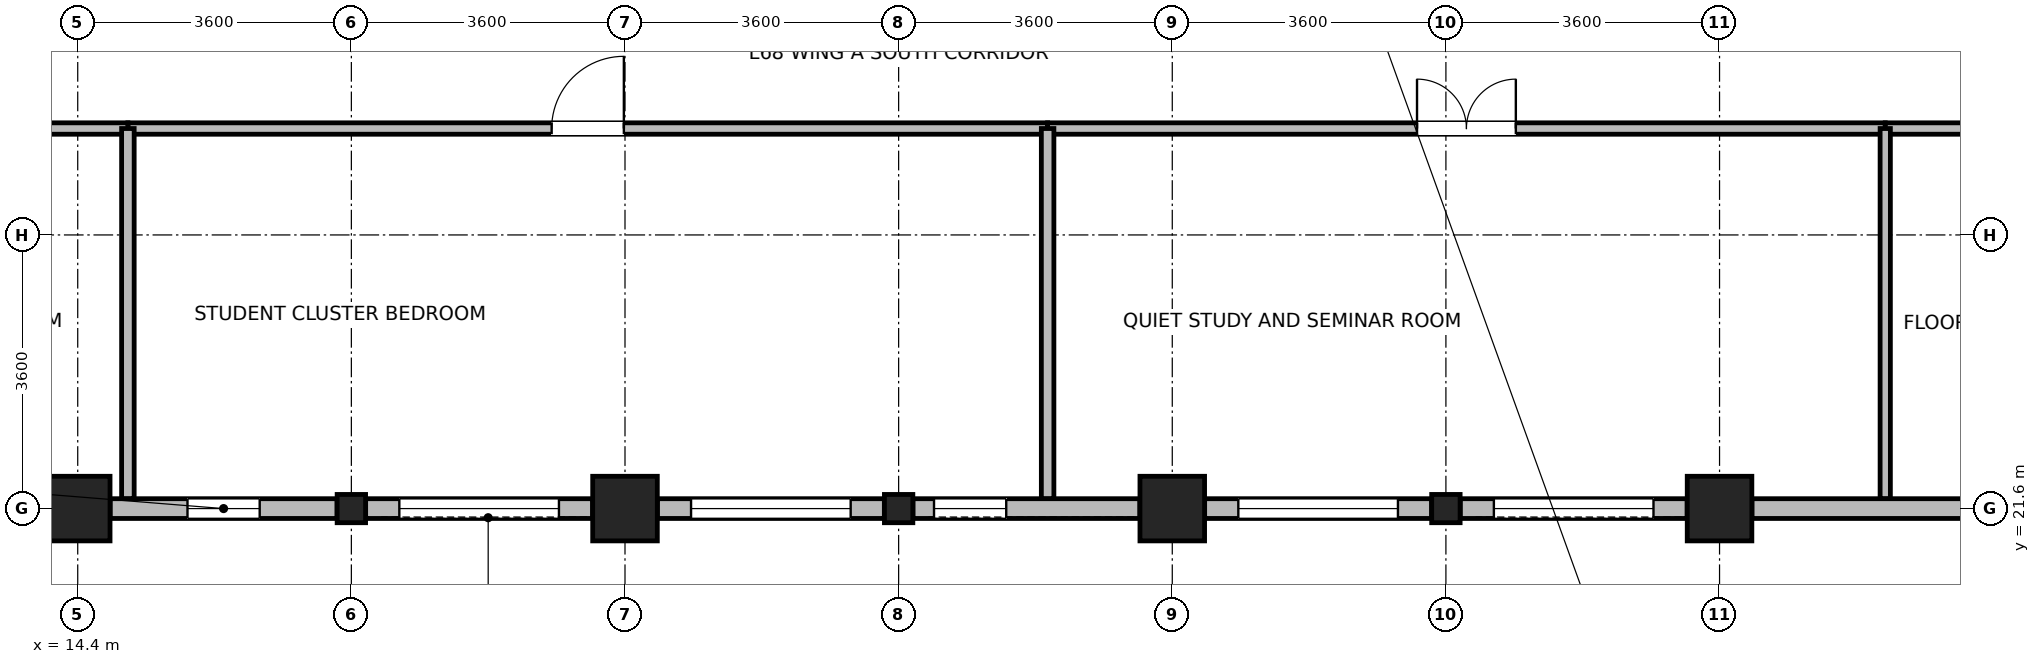
"""IFC4 building model, lengths in metres.
Left out: names, types, materials, properties, quantities, classifications, styles, units other than length and angle.
Written with IfcOpenShell. Run it as: python <this file> out.ifc"""

import sys

from ifc_helpers import new_model, si_unit, direction, frame, frame_2d, origin, origin_2d, place, context, subcontext, project, spatial, rectangle, i_section, extrude, source, transform, mapped, element, fill, save


model = new_model("IFC4")
c1 = context("Model", 3, precision=1e-05, world=origin(), true_north=direction((0.0, 1.0)))
c2 = subcontext(c1, "Body", "Model", "MODEL_VIEW")
j1 = project(units=[si_unit("LENGTHUNIT", "METRE"), si_unit("PLANEANGLEUNIT", "RADIAN")], contexts=[c1])
p1 = place(None, origin())
s1 = spatial("IfcSite", under=j1, at=p1, CompositionType="ELEMENT")
p2 = place(p1, origin())
s2 = spatial("IfcBuilding", under=s1, at=p2, CompositionType="ELEMENT")
p3 = place(p2, frame((0.0, 0.0, 264.7)))
s3 = spatial("IfcBuildingStorey", under=s2, at=p3, CompositionType="ELEMENT", Elevation=264.7)
m1 = source(origin(), c2, "Body", "SweptSolid", [
    extrude(rectangle(XDim=0.85, YDim=0.85, at=origin_2d()), origin(), (0.0, 0.0, 1.0), 3.7),
])
for number, where, z_axis, x_axis in (
    (1, (14.4, 21.6, 0.0), (0.0, 0.0, 1.0), (1.0, 0.0, 0.0)),
    (2, (21.6, 21.6, 0.0), (0.0, 0.0, 1.0), (1.0, 0.0, 0.0)),
    (3, (28.8, 21.6, 0.0), (0.0, 0.0, 1.0), (1.0, 0.0, 0.0)),
    (4, (36.0, 21.6, 0.0), (0.0, 0.0, 1.0), (1.0, 0.0, 0.0)),
):
    element("IfcColumn", number, at=place(p3, frame(where, z_axis=z_axis, x_axis=x_axis)), inside=s3, PredefinedType="COLUMN", context=c2, shape_type="MappedRepresentation", body=[
        mapped(m1, transform((0.0, 0.0, 0.0), x_axis=(1.0, 0.0, 0.0), y_axis=(0.0, 1.0, 0.0), z_axis=(0.0, 0.0, 1.0), scale=1.0)),
    ])
m2 = source(origin(), c2, "Body", "SweptSolid", [
    extrude(i_section(OverallWidth=0.374, OverallDepth=0.372, WebThickness=0.015, FlangeThickness=0.026, FilletRadius=0.015, at=origin_2d()), origin(), (0.0, 0.0, 1.0), 3.7),
])
for number, where, z_axis, x_axis in (
    (5, (18.0, 21.6, 0.0), (0.0, 0.0, 1.0), (1.0, 0.0, 0.0)),
    (6, (25.2, 21.6, 0.0), (0.0, 0.0, 1.0), (1.0, 0.0, 0.0)),
    (7, (32.4, 21.6, 0.0), (0.0, 0.0, 1.0), (1.0, 0.0, 0.0)),
):
    element("IfcColumn", number, at=place(p3, frame(where, z_axis=z_axis, x_axis=x_axis)), inside=s3, PredefinedType="COLUMN", context=c2, shape_type="MappedRepresentation", body=[
        mapped(m2, transform((0.0, 0.0, 0.0), x_axis=(1.0, 0.0, 0.0), y_axis=(0.0, 1.0, 0.0), z_axis=(0.0, 0.0, 1.0), scale=1.0)),
    ])
p4 = place(p3, frame((17.812, 21.6, 0.0), z_axis=(0.0, 0.0, 1.0), x_axis=(-1.0, 0.0, 0.0)))
e8 = element("IfcWall", 8, at=p4, inside=s3, PredefinedType="STANDARD", context=c2, shape_type="SweptSolid", body=[
    extrude(rectangle(XDim=2.986, YDim=0.26, at=frame_2d((1.493, 0.0))), origin(), (0.0, 0.0, 1.0), 3.055),
])
p5 = place(p4, frame((1.018, 0.0, 0.85)))
e9 = element("IfcOpeningElement", 9, at=p5, cuts=e8, PredefinedType="OPENING", context=c2, shape_type="SweptSolid", body=[
    extrude(rectangle(XDim=0.95, YDim=1.75, at=frame_2d((0.475, 0.875))), frame((0.0, 0.14, 0.0), z_axis=(0.0, -1.0, 0.0), x_axis=(1.0, 0.0, 0.0)), (0.0, 0.0, 1.0), 0.28),
])
p6 = place(p3, frame((21.174, 21.6, 0.0), z_axis=(0.0, 0.0, 1.0), x_axis=(-1.0, 0.0, 0.0)))
e10 = element("IfcWall", 10, at=p6, inside=s3, PredefinedType="STANDARD", context=c2, shape_type="SweptSolid", body=[
    extrude(rectangle(XDim=2.986, YDim=0.26, at=frame_2d((1.493, 0.0))), origin(), (0.0, 0.0, 1.0), 3.055),
])
p7 = place(p6, frame((0.443, 0.0, 0.85)))
e11 = element("IfcOpeningElement", 11, at=p7, cuts=e10, PredefinedType="OPENING", context=c2, shape_type="SweptSolid", body=[
    extrude(rectangle(XDim=2.1, YDim=1.95, at=frame_2d((1.05, 0.975))), frame((0.0, 0.14, 0.0), z_axis=(0.0, -1.0, 0.0), x_axis=(1.0, 0.0, 0.0)), (0.0, 0.0, 1.0), 0.28),
])
p8 = place(p3, frame((25.012, 21.6, 0.0), z_axis=(0.0, 0.0, 1.0), x_axis=(-1.0, 0.0, 0.0)))
e12 = element("IfcWall", 12, at=p8, inside=s3, PredefinedType="STANDARD", context=c2, shape_type="SweptSolid", body=[
    extrude(rectangle(XDim=2.986, YDim=0.26, at=frame_2d((1.493, 0.0))), origin(), (0.0, 0.0, 1.0), 3.055),
])
p9 = place(p8, frame((0.443, 0.0, 0.85)))
e13 = element("IfcOpeningElement", 13, at=p9, cuts=e12, PredefinedType="OPENING", context=c2, shape_type="SweptSolid", body=[
    extrude(rectangle(XDim=2.1, YDim=1.95, at=frame_2d((1.05, 0.975))), frame((0.0, 0.14, 0.0), z_axis=(0.0, -1.0, 0.0), x_axis=(1.0, 0.0, 0.0)), (0.0, 0.0, 1.0), 0.28),
])
p10 = place(p3, frame((28.374, 21.6, 0.0), z_axis=(0.0, 0.0, 1.0), x_axis=(-1.0, 0.0, 0.0)))
e14 = element("IfcWall", 14, at=p10, inside=s3, PredefinedType="STANDARD", context=c2, shape_type="SweptSolid", body=[
    extrude(rectangle(XDim=2.986, YDim=0.26, at=frame_2d((1.493, 0.0))), origin(), (0.0, 0.0, 1.0), 3.055),
])
p11 = place(p10, frame((1.759, 0.0, 0.85)))
e15 = element("IfcOpeningElement", 15, at=p11, cuts=e14, PredefinedType="OPENING", context=c2, shape_type="SweptSolid", body=[
    extrude(rectangle(XDim=0.95, YDim=1.75, at=frame_2d((0.475, 0.875))), frame((0.0, 0.14, 0.0), z_axis=(0.0, -1.0, 0.0), x_axis=(1.0, 0.0, 0.0)), (0.0, 0.0, 1.0), 0.28),
])
p12 = place(p3, frame((32.212, 21.6, 0.0), z_axis=(0.0, 0.0, 1.0), x_axis=(-1.0, 0.0, 0.0)))
e16 = element("IfcWall", 16, at=p12, inside=s3, PredefinedType="STANDARD", context=c2, shape_type="SweptSolid", body=[
    extrude(rectangle(XDim=2.986, YDim=0.26, at=frame_2d((1.493, 0.0))), origin(), (0.0, 0.0, 1.0), 3.055),
])
p13 = place(p12, frame((0.443, 0.0, 0.85)))
e17 = element("IfcOpeningElement", 17, at=p13, cuts=e16, PredefinedType="OPENING", context=c2, shape_type="SweptSolid", body=[
    extrude(rectangle(XDim=2.1, YDim=1.95, at=frame_2d((1.05, 0.975))), frame((0.0, 0.14, 0.0), z_axis=(0.0, -1.0, 0.0), x_axis=(1.0, 0.0, 0.0)), (0.0, 0.0, 1.0), 0.28),
])
p14 = place(p3, frame((35.574, 21.6, 0.0), z_axis=(0.0, 0.0, 1.0), x_axis=(-1.0, 0.0, 0.0)))
e18 = element("IfcWall", 18, at=p14, inside=s3, PredefinedType="STANDARD", context=c2, shape_type="SweptSolid", body=[
    extrude(rectangle(XDim=2.986, YDim=0.26, at=frame_2d((1.493, 0.0))), origin(), (0.0, 0.0, 1.0), 3.055),
])
p15 = place(p14, frame((0.443, 0.0, 0.85)))
e19 = element("IfcOpeningElement", 19, at=p15, cuts=e18, PredefinedType="OPENING", context=c2, shape_type="SweptSolid", body=[
    extrude(rectangle(XDim=2.1, YDim=1.95, at=frame_2d((1.05, 0.975))), frame((0.0, 0.14, 0.0), z_axis=(0.0, -1.0, 0.0), x_axis=(1.0, 0.0, 0.0)), (0.0, 0.0, 1.0), 0.28),
])
p16 = place(p3, frame((46.374, 21.6, 0.0), z_axis=(0.0, 0.0, 1.0), x_axis=(-1.0, 0.0, 0.0)))
e20 = element("IfcWall", 20, at=p16, inside=s3, PredefinedType="STANDARD", context=c2, shape_type="SweptSolid", body=[
    extrude(rectangle(XDim=9.948, YDim=0.26, at=frame_2d((4.974, 0.0))), origin(), (0.0, 0.0, 1.0), 3.055),
])
p17 = place(p16, frame((0.608, 0.0, 0.85)))
e21 = element("IfcOpeningElement", 21, at=p17, cuts=e20, PredefinedType="OPENING", context=c2, shape_type="SweptSolid", body=[
    extrude(rectangle(XDim=2.1, YDim=1.95, at=frame_2d((1.05, 0.975))), frame((0.0, 0.14, 0.0), z_axis=(0.0, -1.0, 0.0), x_axis=(1.0, 0.0, 0.0)), (0.0, 0.0, 1.0), 0.28),
])
p18 = place(p16, frame((3.924, 0.0, 0.85)))
e22 = element("IfcOpeningElement", 22, at=p18, cuts=e20, PredefinedType="OPENING", context=c2, shape_type="SweptSolid", body=[
    extrude(rectangle(XDim=2.1, YDim=1.95, at=frame_2d((1.05, 0.975))), frame((0.0, 0.14, 0.0), z_axis=(0.0, -1.0, 0.0), x_axis=(1.0, 0.0, 0.0)), (0.0, 0.0, 1.0), 0.28),
])
p19 = place(p3, frame((15.06, 26.6, 0.0), z_axis=(0.0, 0.0, 1.0), x_axis=(1.0, 0.0, 0.0)))
e23 = element("IfcWall", 23, at=p19, inside=s3, PredefinedType="PARTITIONING", context=c2, shape_type="SweptSolid", body=[
    extrude(rectangle(XDim=12.1, YDim=0.15, at=frame_2d((6.05, 0.0))), origin(), (0.0, 0.0, 1.0), 3.455),
])
p20 = place(p19, frame((5.575, 0.0, 0.0)))
e24 = element("IfcOpeningElement", 24, at=p20, cuts=e23, PredefinedType="OPENING", context=c2, shape_type="SweptSolid", body=[
    extrude(rectangle(XDim=0.95, YDim=2.1, at=frame_2d((0.475, 1.05))), frame((0.0, 0.085, 0.0), z_axis=(0.0, -1.0, 0.0), x_axis=(1.0, 0.0, 0.0)), (0.0, 0.0, 1.0), 0.17),
])
p21 = place(p3, frame((3.732, 26.6, 0.0), z_axis=(0.0, 0.0, 1.0), x_axis=(1.0, 0.0, 0.0)))
e25 = element("IfcWall", 25, at=p21, inside=s3, PredefinedType="PARTITIONING", context=c2, shape_type="SweptSolid", body=[
    extrude(rectangle(XDim=11.328, YDim=0.15, at=frame_2d((5.664, 0.0))), origin(), (0.0, 0.0, 1.0), 3.455),
])
p22 = place(p21, frame((5.189, 0.0, 0.0)))
e26 = element("IfcOpeningElement", 26, at=p22, cuts=e25, PredefinedType="OPENING", context=c2, shape_type="SweptSolid", body=[
    extrude(rectangle(XDim=0.95, YDim=2.1, at=frame_2d((0.475, 1.05))), frame((0.0, 0.085, 0.0), z_axis=(0.0, -1.0, 0.0), x_axis=(1.0, 0.0, 0.0)), (0.0, 0.0, 1.0), 0.17),
])
p23 = place(p3, frame((27.16, 26.6, 0.0), z_axis=(0.0, 0.0, 1.0), x_axis=(1.0, 0.0, 0.0)))
e27 = element("IfcWall", 27, at=p23, inside=s3, PredefinedType="PARTITIONING", context=c2, shape_type="SweptSolid", body=[
    extrude(rectangle(XDim=11.02, YDim=0.15, at=frame_2d((5.51, 0.0))), origin(), (0.0, 0.0, 1.0), 3.455),
])
p24 = place(p23, frame((4.86, 0.0, 0.0)))
e28 = element("IfcOpeningElement", 28, at=p24, cuts=e27, PredefinedType="OPENING", context=c2, shape_type="SweptSolid", body=[
    extrude(rectangle(XDim=1.3, YDim=2.12, at=frame_2d((0.65, 1.06))), frame((0.0, 0.085, 0.0), z_axis=(0.0, -1.0, 0.0), x_axis=(1.0, 0.0, 0.0)), (0.0, 0.0, 1.0), 0.17),
])
p25 = place(p3, frame((38.18, 26.6, 0.0), z_axis=(0.0, 0.0, 1.0), x_axis=(1.0, 0.0, 0.0)))
e29 = element("IfcWall", 29, at=p25, inside=s3, PredefinedType="PARTITIONING", context=c2, shape_type="SweptSolid", body=[
    extrude(rectangle(XDim=8.6, YDim=0.15, at=frame_2d((4.3, 0.0))), origin(), (0.0, 0.0, 1.0), 3.455),
])
p26 = place(p25, frame((3.875, 0.0, 0.0)))
e30 = element("IfcOpeningElement", 30, at=p26, cuts=e29, PredefinedType="OPENING", context=c2, shape_type="SweptSolid", body=[
    extrude(rectangle(XDim=0.85, YDim=2.04, at=frame_2d((0.425, 1.02))), frame((0.0, 0.085, 0.0), z_axis=(0.0, -1.0, 0.0), x_axis=(1.0, 0.0, 0.0)), (0.0, 0.0, 1.0), 0.17),
])
for number, where, z_axis, x_axis in (
    (31, (15.06, 21.732, 0.0), (0.0, 0.0, 1.0), (0.0, 1.0, 0.0)),
    (32, (27.16, 21.732, 0.0), (0.0, 0.0, 1.0), (0.0, 1.0, 0.0)),
):
    element("IfcWall", number, at=place(p3, frame(where, z_axis=z_axis, x_axis=x_axis)), inside=s3, PredefinedType="PARTITIONING", context=c2, shape_type="SweptSolid", body=[
        extrude(rectangle(XDim=4.868, YDim=0.165, at=frame_2d((2.434, 0.0))), origin(), (0.0, 0.0, 1.0), 3.455),
    ])
p27 = place(p3, frame((38.18, 21.732, 0.0), z_axis=(0.0, 0.0, 1.0), x_axis=(0.0, 1.0, 0.0)))
e33 = element("IfcWall", 33, at=p27, inside=s3, PredefinedType="PARTITIONING", context=c2, shape_type="SweptSolid", body=[
    extrude(rectangle(XDim=4.868, YDim=0.135, at=frame_2d((2.434, 0.0))), origin(), (0.0, 0.0, 1.0), 3.455),
])
p28 = place(p5, origin())
e34 = element("IfcWindow", 34, at=p28, inside=s3, PartitioningType="SINGLE_PANEL", PredefinedType="WINDOW", context=c2, shape_type="SweptSolid", body=[
    extrude(rectangle(XDim=0.95, YDim=1.75, at=frame_2d((0.475, 0.875))), frame((0.0, 0.03, 0.0), z_axis=(0.0, -1.0, 0.0), x_axis=(1.0, 0.0, 0.0)), (0.0, 0.0, 1.0), 0.06),
])
fill(e9, e34)
p29 = place(p7, origin())
e35 = element("IfcWindow", 35, at=p29, inside=s3, PartitioningType="SINGLE_PANEL", PredefinedType="WINDOW", context=c2, shape_type="SweptSolid", body=[
    extrude(rectangle(XDim=2.1, YDim=1.95, at=frame_2d((1.05, 0.975))), frame((0.0, 0.03, 0.0), z_axis=(0.0, -1.0, 0.0), x_axis=(1.0, 0.0, 0.0)), (0.0, 0.0, 1.0), 0.06),
])
fill(e11, e35)
p30 = place(p9, origin())
e36 = element("IfcWindow", 36, at=p30, inside=s3, PartitioningType="SINGLE_PANEL", PredefinedType="WINDOW", context=c2, shape_type="SweptSolid", body=[
    extrude(rectangle(XDim=2.1, YDim=1.95, at=frame_2d((1.05, 0.975))), frame((0.0, 0.03, 0.0), z_axis=(0.0, -1.0, 0.0), x_axis=(1.0, 0.0, 0.0)), (0.0, 0.0, 1.0), 0.06),
])
fill(e13, e36)
p31 = place(p11, origin())
e37 = element("IfcWindow", 37, at=p31, inside=s3, PartitioningType="SINGLE_PANEL", PredefinedType="WINDOW", context=c2, shape_type="SweptSolid", body=[
    extrude(rectangle(XDim=0.95, YDim=1.75, at=frame_2d((0.475, 0.875))), frame((0.0, 0.03, 0.0), z_axis=(0.0, -1.0, 0.0), x_axis=(1.0, 0.0, 0.0)), (0.0, 0.0, 1.0), 0.06),
])
fill(e15, e37)
p32 = place(p13, origin())
e38 = element("IfcWindow", 38, at=p32, inside=s3, PartitioningType="SINGLE_PANEL", PredefinedType="WINDOW", context=c2, shape_type="SweptSolid", body=[
    extrude(rectangle(XDim=2.1, YDim=1.95, at=frame_2d((1.05, 0.975))), frame((0.0, 0.03, 0.0), z_axis=(0.0, -1.0, 0.0), x_axis=(1.0, 0.0, 0.0)), (0.0, 0.0, 1.0), 0.06),
])
fill(e17, e38)
p33 = place(p15, origin())
e39 = element("IfcWindow", 39, at=p33, inside=s3, PartitioningType="SINGLE_PANEL", PredefinedType="WINDOW", context=c2, shape_type="SweptSolid", body=[
    extrude(rectangle(XDim=2.1, YDim=1.95, at=frame_2d((1.05, 0.975))), frame((0.0, 0.03, 0.0), z_axis=(0.0, -1.0, 0.0), x_axis=(1.0, 0.0, 0.0)), (0.0, 0.0, 1.0), 0.06),
])
fill(e19, e39)
p34 = place(p20, origin())
e40 = element("IfcDoor", 40, at=p34, inside=s3, OperationType="SINGLE_SWING_RIGHT", PredefinedType="DOOR", context=c2, shape_type="SweptSolid", body=[
    extrude(rectangle(XDim=0.95, YDim=2.1, at=frame_2d((0.475, 1.05))), frame((0.0, 0.025, 0.0), z_axis=(0.0, -1.0, 0.0), x_axis=(1.0, 0.0, 0.0)), (0.0, 0.0, 1.0), 0.05),
])
fill(e24, e40)
p35 = place(p24, origin())
e41 = element("IfcDoor", 41, at=p35, inside=s3, OperationType="DOUBLE_DOOR_SINGLE_SWING", PredefinedType="DOOR", context=c2, shape_type="SweptSolid", body=[
    extrude(rectangle(XDim=1.3, YDim=2.12, at=frame_2d((0.65, 1.06))), frame((0.0, 0.025, 0.0), z_axis=(0.0, -1.0, 0.0), x_axis=(1.0, 0.0, 0.0)), (0.0, 0.0, 1.0), 0.05),
])
fill(e28, e41)
save(model, sys.argv[1])
